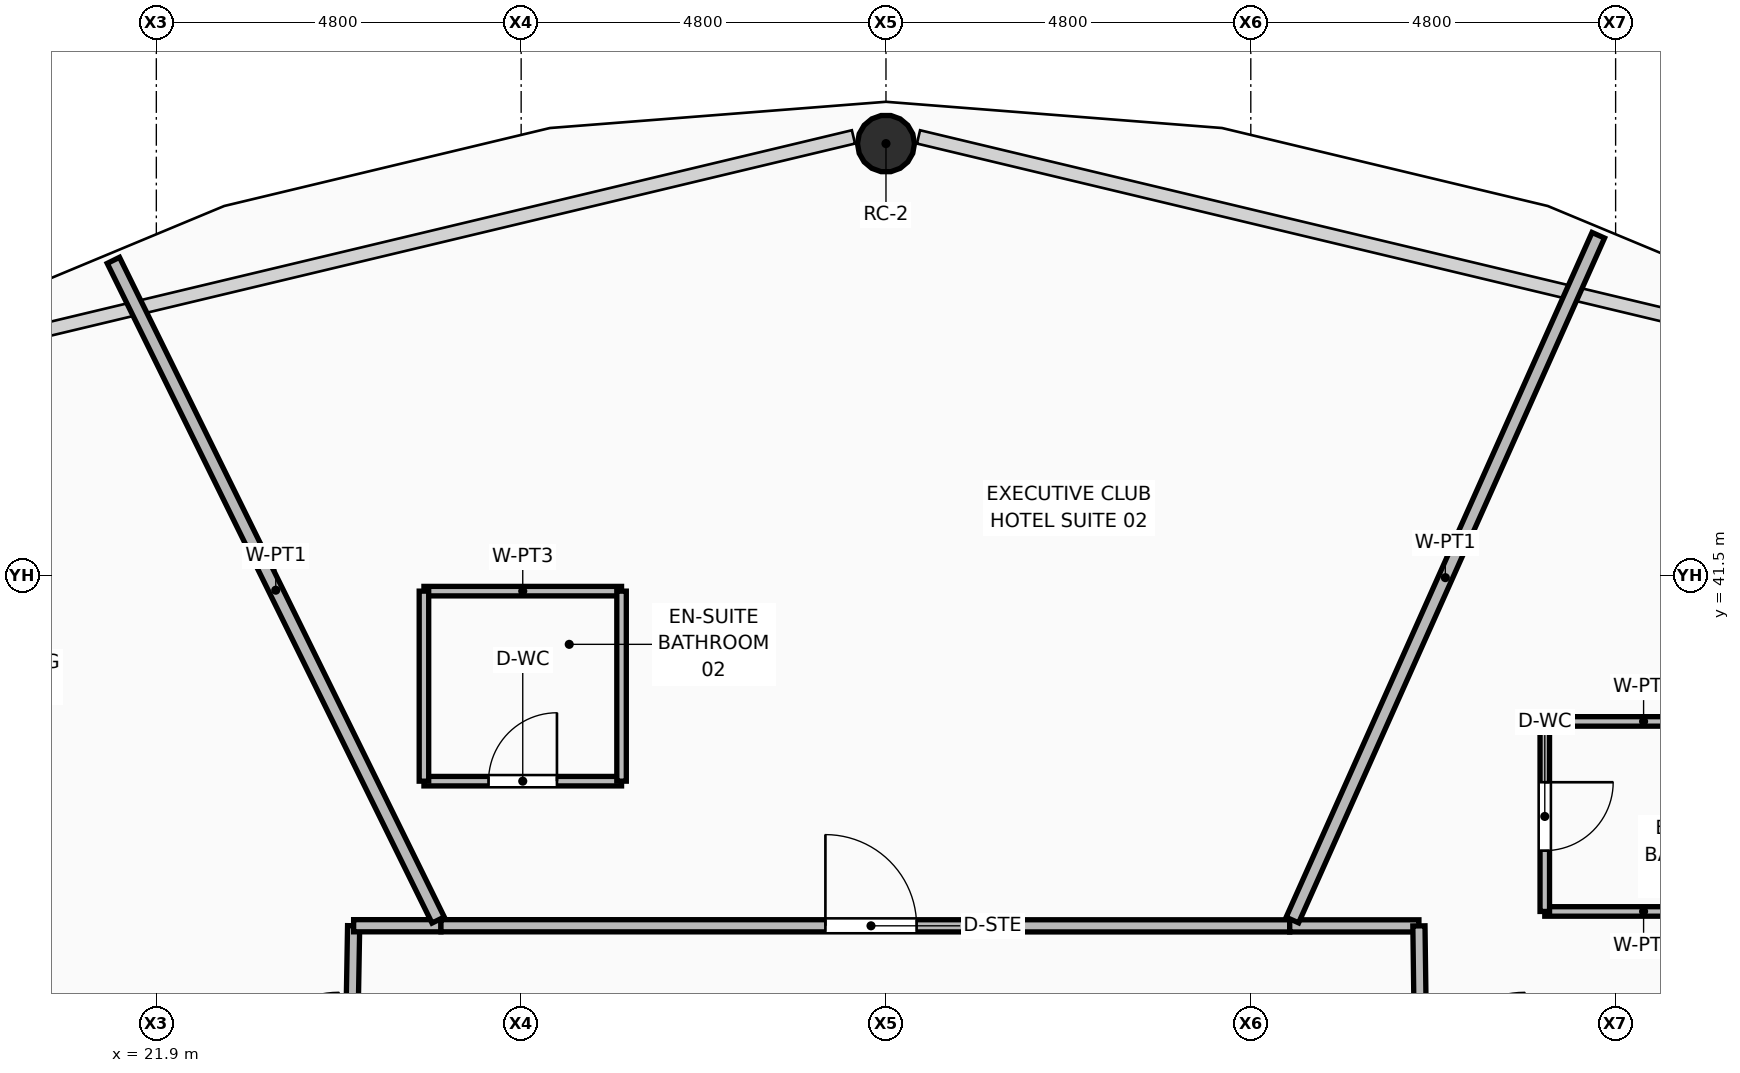
"""IFC4 building model, lengths in metres.
Left out: names, types, materials, properties, quantities, classifications, styles, units other than length and angle.
Written with IfcOpenShell. Run it as: python <this file> out.ifc"""

import sys

from ifc_helpers import new_model, si_unit, direction, frame, frame_2d, origin, origin_2d, place, context, subcontext, project, spatial, rectangle, hollow_circle, extrude, element, fill, save


model = new_model("IFC4")
c1 = context("Model", 3, precision=1e-05, world=origin(), true_north=direction((0.0, 1.0)))
c2 = subcontext(c1, "Body", "Model", "MODEL_VIEW")
j1 = project(units=[si_unit("LENGTHUNIT", "METRE"), si_unit("PLANEANGLEUNIT", "RADIAN")], contexts=[c1])
p1 = place(None, origin())
s1 = spatial("IfcSite", under=j1, at=p1, CompositionType="ELEMENT")
p2 = place(p1, origin())
s2 = spatial("IfcBuilding", under=s1, at=p2, CompositionType="ELEMENT")
p3 = place(p2, frame((0.0, 0.0, 142.2)))
s3 = spatial("IfcBuildingStorey", under=s2, at=p3, CompositionType="ELEMENT", Elevation=142.2)
p4 = place(p3, frame((31.5, 47.18, 0.0), z_axis=(0.0, -0.015658341295, 0.999877400659), x_axis=(1.0, 0.0, 0.0)))
e1 = element("IfcColumn", 1, at=p4, inside=s3, PredefinedType="COLUMN", context=c2, shape_type="SweptSolid", body=[
    extrude(hollow_circle(Radius=0.375, WallThickness=0.035, at=origin_2d()), origin(), (0.0, 0.0, 1.0), 3.571),
])
p5 = place(p3, frame((24.46, 34.815, 0.0), z_axis=(0.0, 0.0, 1.0), x_axis=(0.0174111737, 0.999848414026, 0.0)))
e2 = element("IfcWall", 2, at=p5, inside=s3, PredefinedType="PARTITIONING", context=c2, shape_type="SweptSolid", body=[
    extrude(rectangle(XDim=2.075, YDim=0.16, at=frame_2d((1.038, 0.0))), origin(), (0.0, 0.0, 1.0), 3.55),
])
p6 = place(p3, frame((24.496, 36.89, 0.0), z_axis=(0.0, 0.0, 1.0), x_axis=(1.0, 0.0, 0.0)))
e3 = element("IfcWall", 3, at=p6, inside=s3, PredefinedType="PARTITIONING", context=c2, shape_type="SweptSolid", body=[
    extrude(rectangle(XDim=1.149, YDim=0.16, at=frame_2d((0.574, 0.0))), origin(), (0.0, 0.0, 1.0), 3.55),
])
p7 = place(p3, frame((25.645, 36.89, 0.0), z_axis=(0.0, 0.0, 1.0), x_axis=(0.999999984705, -0.000174901615, 0.0)))
e4 = element("IfcWall", 4, at=p7, inside=s3, PredefinedType="PARTITIONING", context=c2, shape_type="SweptSolid", body=[
    extrude(rectangle(XDim=11.167, YDim=0.16, at=frame_2d((5.583, 0.0))), origin(), (0.0, 0.0, 1.0), 3.006),
])
p8 = place(p7, frame((5.058, 0.0, 0.0)))
e5 = element("IfcOpeningElement", 5, at=p8, cuts=e4, PredefinedType="OPENING", context=c2, shape_type="SweptSolid", body=[
    extrude(rectangle(XDim=1.2, YDim=2.1, at=frame_2d((0.6, 1.05))), frame((0.0, 0.09, 0.0), z_axis=(0.0, -1.0, 0.0), x_axis=(1.0, 0.0, 0.0)), (0.0, 0.0, 1.0), 0.18),
])
p9 = place(p3, frame((36.812, 36.888, 0.0), z_axis=(0.0, 0.0, 1.0), x_axis=(1.0, 0.0, 0.0)))
e6 = element("IfcWall", 6, at=p9, inside=s3, PredefinedType="PARTITIONING", context=c2, shape_type="SweptSolid", body=[
    extrude(rectangle(XDim=1.7, YDim=0.16, at=frame_2d((0.85, 0.0))), origin(), (0.0, 0.0, 1.0), 3.55),
])
p10 = place(p3, frame((38.512, 36.888, 0.0), z_axis=(0.0, 0.0, 1.0), x_axis=(0.013542510192, -0.999908296004, 0.0)))
e7 = element("IfcWall", 7, at=p10, inside=s3, PredefinedType="PARTITIONING", context=c2, shape_type="SweptSolid", body=[
    extrude(rectangle(XDim=2.073, YDim=0.16, at=frame_2d((1.037, 0.0))), origin(), (0.0, 0.0, 1.0), 3.55),
])
p11 = place(p3, frame((36.847, 36.965, 0.0), z_axis=(0.0, 0.0, 1.0), x_axis=(0.407926019729, 0.913014984777, 0.0)))
e8 = element("IfcWall", 8, at=p11, inside=s3, PredefinedType="PARTITIONING", context=c2, shape_type="SweptSolid", body=[
    extrude(rectangle(XDim=9.867, YDim=0.18, at=frame_2d((4.934, 0.0))), origin(), (0.0, 0.0, 1.0), 2.852),
])
p12 = place(p3, frame((25.608, 36.965, 0.0), z_axis=(0.0, 0.0, 1.0), x_axis=(-0.441703401355, 0.897161136715, 0.0)))
e9 = element("IfcWall", 9, at=p12, inside=s3, PredefinedType="PARTITIONING", context=c2, shape_type="SweptSolid", body=[
    extrude(rectangle(XDim=9.674, YDim=0.18, at=frame_2d((4.837, 0.0))), origin(), (0.0, 0.0, 1.0), 2.852),
])
for number, where, z_axis, x_axis in (
    (10, (40.168, 37.078, 0.0), (0.0, 0.0, 1.0), (1.0, 0.0, 0.0)),
    (11, (40.168, 39.578, 0.0), (0.0, 0.0, 1.0), (1.0, 0.0, 0.0)),
):
    element("IfcWall", number, at=place(p3, frame(where, z_axis=z_axis, x_axis=x_axis)), inside=s3, PredefinedType="PARTITIONING", context=c2, shape_type="SweptSolid", body=[
        extrude(rectangle(XDim=2.6, YDim=0.125, at=frame_2d((1.3, 0.0))), origin(), (0.0, 0.0, 1.0), 3.006),
    ])
p13 = place(p3, frame((40.168, 37.078, 0.0), z_axis=(0.0, 0.0, 1.0), x_axis=(0.0, 1.0, 0.0)))
e12 = element("IfcWall", 12, at=p13, inside=s3, PredefinedType="PARTITIONING", context=c2, shape_type="SweptSolid", body=[
    extrude(rectangle(XDim=2.5, YDim=0.125, at=frame_2d((1.25, 0.0))), origin(), (0.0, 0.0, 1.0), 3.55),
])
p14 = place(p13, frame((0.8, 0.0, 0.0)))
e13 = element("IfcOpeningElement", 13, at=p14, cuts=e12, PredefinedType="OPENING", context=c2, shape_type="SweptSolid", body=[
    extrude(rectangle(XDim=0.9, YDim=2.1, at=frame_2d((0.45, 1.05))), frame((0.0, 0.073, 0.0), z_axis=(0.0, -1.0, 0.0), x_axis=(1.0, 0.0, 0.0)), (0.0, 0.0, 1.0), 0.145),
])
p15 = place(p3, frame((25.421, 38.792, 0.0), z_axis=(0.0, 0.0, 1.0), x_axis=(1.0, 0.0, 0.0)))
e14 = element("IfcWall", 14, at=p15, inside=s3, PredefinedType="PARTITIONING", context=c2, shape_type="SweptSolid", body=[
    extrude(rectangle(XDim=2.6, YDim=0.125, at=frame_2d((1.3, 0.0))), origin(), (0.0, 0.0, 1.0), 3.55),
])
p16 = place(p15, frame((0.85, 0.0, 0.0)))
e15 = element("IfcOpeningElement", 15, at=p16, cuts=e14, PredefinedType="OPENING", context=c2, shape_type="SweptSolid", body=[
    extrude(rectangle(XDim=0.9, YDim=2.1, at=frame_2d((0.45, 1.05))), frame((0.0, 0.073, 0.0), z_axis=(0.0, -1.0, 0.0), x_axis=(1.0, 0.0, 0.0)), (0.0, 0.0, 1.0), 0.145),
])
p17 = place(p3, frame((25.421, 41.292, 0.0), z_axis=(0.0, 0.0, 1.0), x_axis=(1.0, 0.0, 0.0)))
e16 = element("IfcWall", 16, at=p17, inside=s3, PredefinedType="PARTITIONING", context=c2, shape_type="SweptSolid", body=[
    extrude(rectangle(XDim=2.6, YDim=0.125, at=frame_2d((1.3, 0.0))), origin(), (0.0, 0.0, 1.0), 3.55),
])
for number, where, z_axis, x_axis in (
    (17, (25.421, 38.792, 0.0), (0.0, 0.0, 1.0), (0.0, 1.0, 0.0)),
    (18, (28.021, 38.792, 0.0), (0.0, 0.0, 1.0), (0.0, 1.0, 0.0)),
):
    element("IfcWall", number, at=place(p3, frame(where, z_axis=z_axis, x_axis=x_axis)), inside=s3, PredefinedType="PARTITIONING", context=c2, shape_type="SweptSolid", body=[
        extrude(rectangle(XDim=2.5, YDim=0.125, at=frame_2d((1.25, 0.0))), origin(), (0.0, 0.0, 1.0), 3.55),
    ])
p18 = place(p14, frame((0.9, 0.0, 0.0), z_axis=(0.0, 0.0, 1.0), x_axis=(-1.0, 0.0, 0.0)))
e19 = element("IfcDoor", 19, at=p18, inside=s3, OperationType="SINGLE_SWING_LEFT", PredefinedType="DOOR", context=c2, shape_type="SweptSolid", body=[
    extrude(rectangle(XDim=0.9, YDim=2.1, at=frame_2d((0.45, 1.05))), frame((0.0, 0.025, 0.0), z_axis=(0.0, -1.0, 0.0), x_axis=(1.0, 0.0, 0.0)), (0.0, 0.0, 1.0), 0.05),
])
fill(e13, e19)
p19 = place(p16, origin())
e20 = element("IfcDoor", 20, at=p19, inside=s3, OperationType="SINGLE_SWING_RIGHT", PredefinedType="DOOR", context=c2, shape_type="SweptSolid", body=[
    extrude(rectangle(XDim=0.9, YDim=2.1, at=frame_2d((0.45, 1.05))), frame((0.0, 0.025, 0.0), z_axis=(0.0, -1.0, 0.0), x_axis=(1.0, 0.0, 0.0)), (0.0, 0.0, 1.0), 0.05),
])
fill(e15, e20)
p20 = place(p8, origin())
e21 = element("IfcDoor", 21, at=p20, inside=s3, OperationType="SINGLE_SWING_LEFT", PredefinedType="DOOR", context=c2, shape_type="SweptSolid", body=[
    extrude(rectangle(XDim=1.2, YDim=2.1, at=frame_2d((0.6, 1.05))), frame((0.0, 0.025, 0.0), z_axis=(0.0, -1.0, 0.0), x_axis=(1.0, 0.0, 0.0)), (0.0, 0.0, 1.0), 0.05),
])
fill(e5, e21)
save(model, sys.argv[1])
